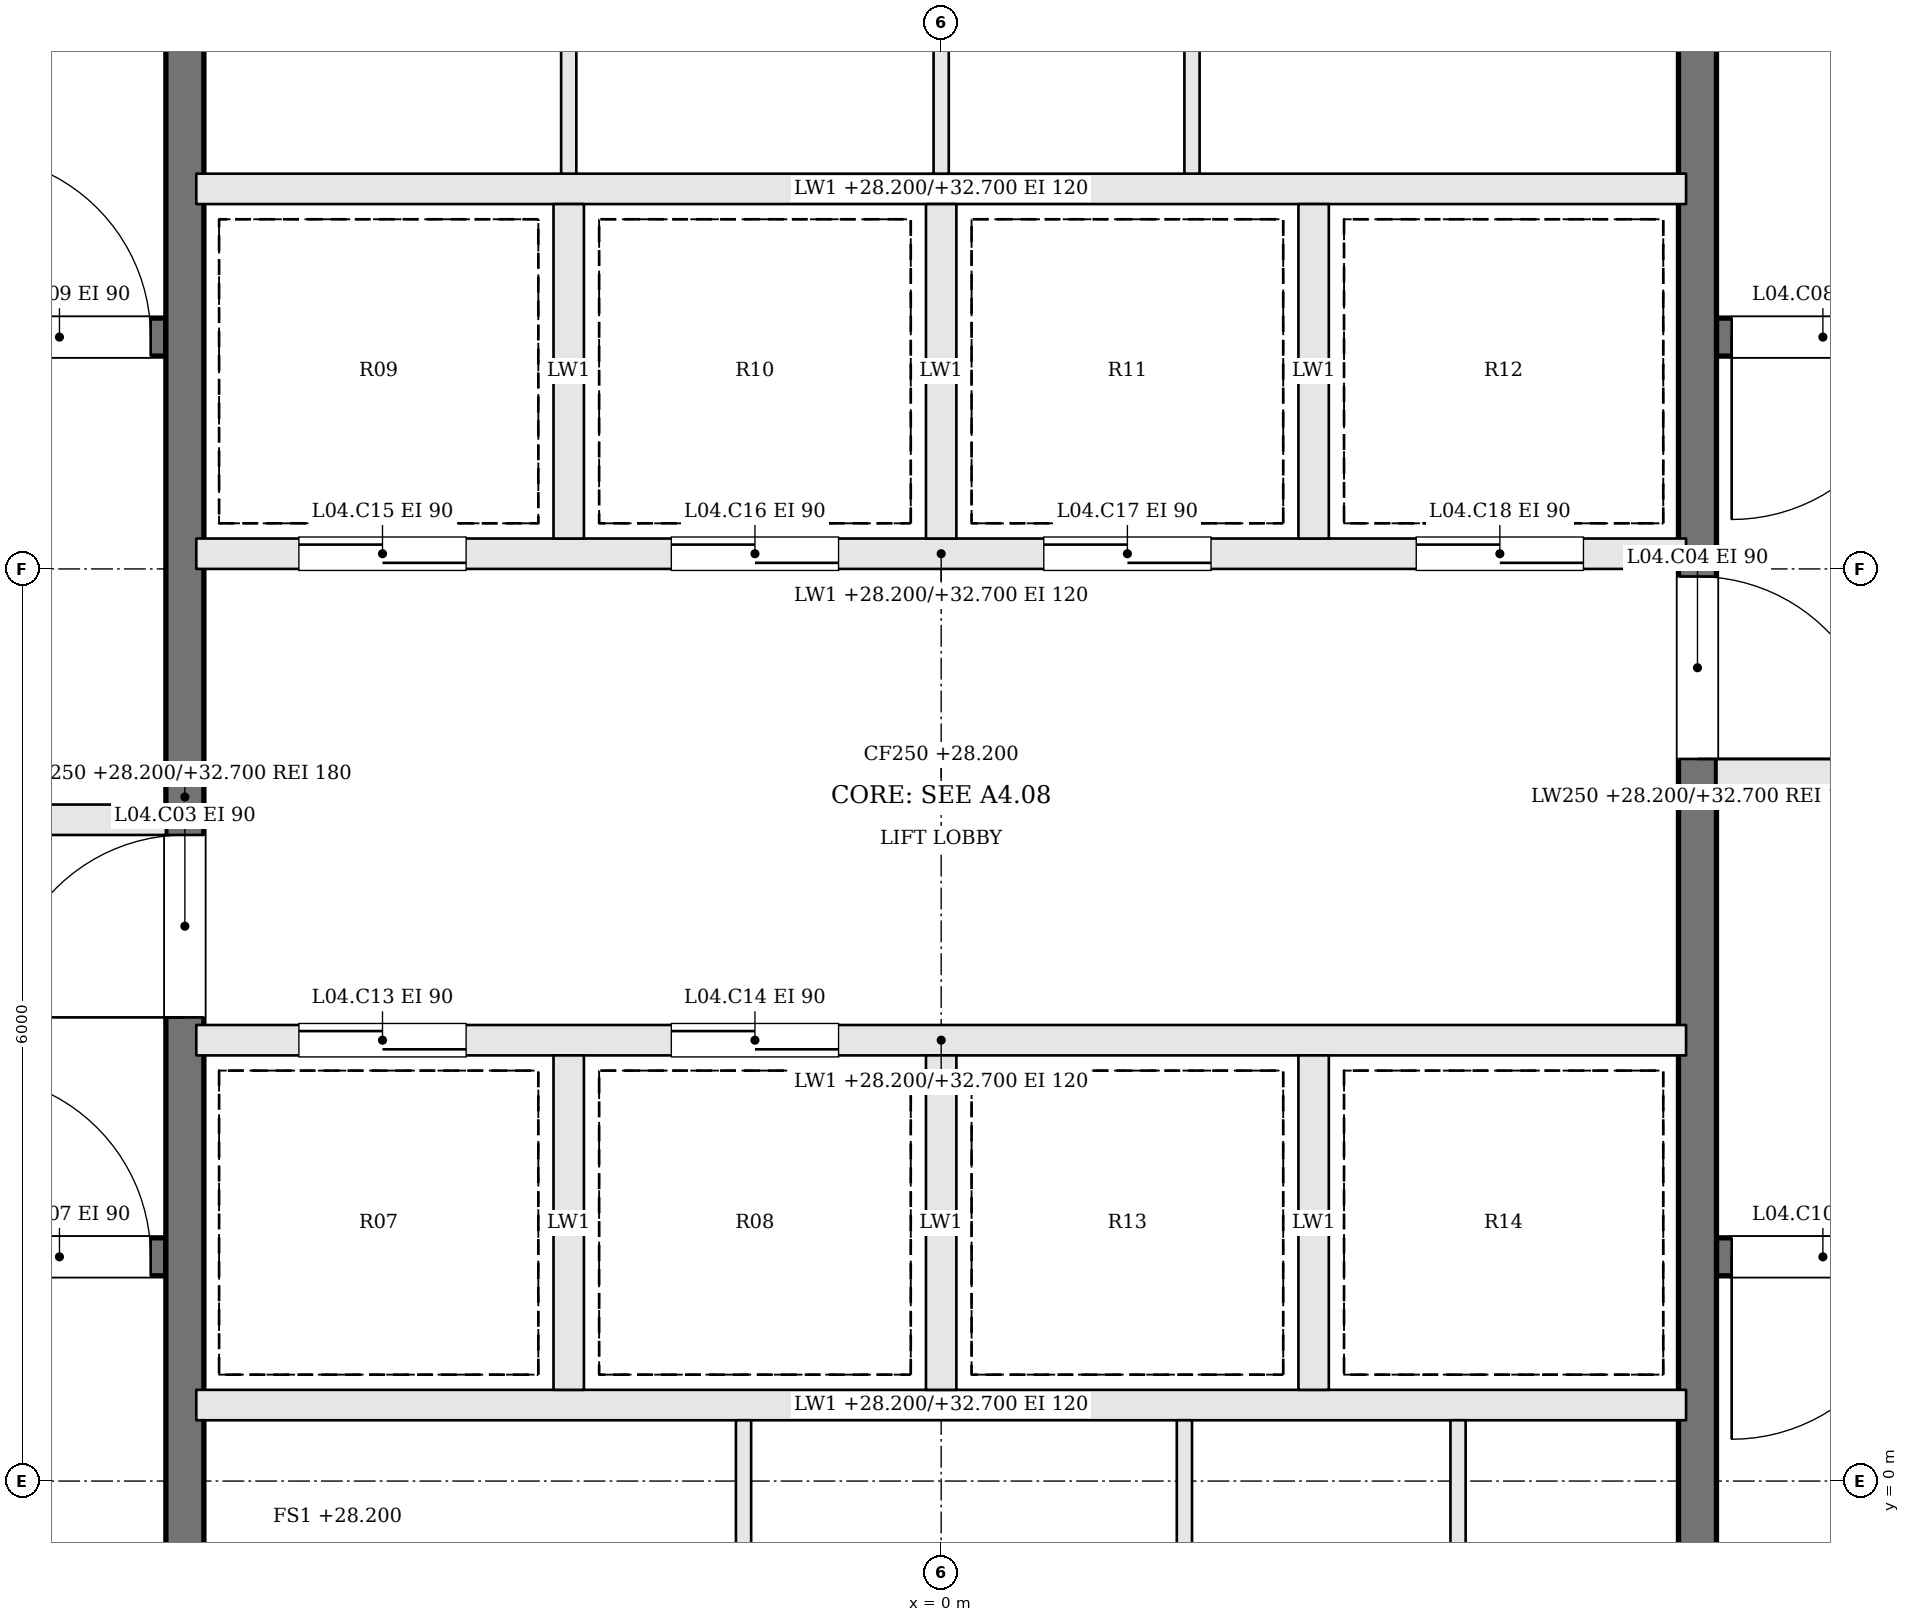
"""IFC4 building model, lengths in metres.
Left out: names, types, materials, properties, quantities, classifications, styles, units other than length and angle.
Written with IfcOpenShell. Run it as: python <this file> out.ifc"""

import sys

from ifc_helpers import new_model, si_unit, direction, frame, frame_2d, origin, place, context, subcontext, project, spatial, rectangle, extrude, element, fill, save


model = new_model("IFC4")
c1 = context("Model", 3, precision=1e-05, world=origin(), true_north=direction((0.0, 1.0)))
c2 = subcontext(c1, "Body", "Model", "MODEL_VIEW")
j1 = project(units=[si_unit("LENGTHUNIT", "METRE"), si_unit("PLANEANGLEUNIT", "RADIAN")], contexts=[c1])
p1 = place(None, origin())
s1 = spatial("IfcSite", under=j1, at=p1, CompositionType="ELEMENT")
p2 = place(p1, origin())
s2 = spatial("IfcBuilding", under=s1, at=p2, CompositionType="ELEMENT")
p3 = place(p2, frame((0.0, 0.0, 28.2)))
s3 = spatial("IfcBuildingStorey", under=s2, at=p3, CompositionType="ELEMENT", Elevation=28.2)
p4 = place(p3, frame((-11.6, 1.475, 0.0), z_axis=(0.0, 0.0, 1.0), x_axis=(1.0, 0.0, 0.0)))
e1 = element("IfcWall", 1, at=p4, inside=s3, PredefinedType="SOLIDWALL", context=c2, shape_type="SweptSolid", body=[
    extrude(rectangle(XDim=6.5, YDim=0.25, at=frame_2d((3.25, 0.0))), origin(), (0.0, 0.0, 1.0), 4.5),
])
p5 = place(p4, frame((5.2, 0.0, 0.0)))
e2 = element("IfcOpeningElement", 2, at=p5, cuts=e1, PredefinedType="OPENING", context=c2, shape_type="SweptSolid", body=[
    extrude(rectangle(XDim=1.2, YDim=2.1, at=frame_2d((0.6, 1.05))), frame((0.0, 0.135, 0.0), z_axis=(0.0, -1.0, 0.0), x_axis=(1.0, 0.0, 0.0)), (0.0, 0.0, 1.0), 0.27),
])
p6 = place(p3, frame((11.6, 7.525, 0.0), z_axis=(0.0, 0.0, 1.0), x_axis=(-1.0, 0.0, 0.0)))
e3 = element("IfcWall", 3, at=p6, inside=s3, PredefinedType="SOLIDWALL", context=c2, shape_type="SweptSolid", body=[
    extrude(rectangle(XDim=6.5, YDim=0.25, at=frame_2d((3.25, 0.0))), origin(), (0.0, 0.0, 1.0), 4.5),
])
p7 = place(p6, frame((5.2, 0.0, 0.0)))
e4 = element("IfcOpeningElement", 4, at=p7, cuts=e3, PredefinedType="OPENING", context=c2, shape_type="SweptSolid", body=[
    extrude(rectangle(XDim=1.2, YDim=2.1, at=frame_2d((0.6, 1.05))), frame((0.0, 0.135, 0.0), z_axis=(0.0, -1.0, 0.0), x_axis=(1.0, 0.0, 0.0)), (0.0, 0.0, 1.0), 0.27),
])
p8 = place(p3, frame((-11.6, 4.35, 0.0), z_axis=(0.0, 0.0, 1.0), x_axis=(1.0, 0.0, 0.0)))
e5 = element("IfcWall", 5, at=p8, inside=s3, PredefinedType="SOLIDWALL", context=c2, shape_type="SweptSolid", body=[
    extrude(rectangle(XDim=6.5, YDim=0.2, at=frame_2d((3.25, 0.0))), origin(), (0.0, 0.0, 1.0), 4.5),
])
p9 = place(p8, frame((3.8, 0.0, 0.0)))
e6 = element("IfcOpeningElement", 6, at=p9, cuts=e5, PredefinedType="OPENING", context=c2, shape_type="SweptSolid", body=[
    extrude(rectangle(XDim=1.2, YDim=2.1, at=frame_2d((0.6, 1.05))), frame((0.0, 0.11, 0.0), z_axis=(0.0, -1.0, 0.0), x_axis=(1.0, 0.0, 0.0)), (0.0, 0.0, 1.0), 0.22),
])
p10 = place(p8, frame((0.5, 0.0, 0.0)))
e7 = element("IfcOpeningElement", 7, at=p10, cuts=e5, PredefinedType="OPENING", context=c2, shape_type="SweptSolid", body=[
    extrude(rectangle(XDim=1.2, YDim=2.1, at=frame_2d((0.6, 1.05))), frame((0.0, 0.11, 0.0), z_axis=(0.0, -1.0, 0.0), x_axis=(1.0, 0.0, 0.0)), (0.0, 0.0, 1.0), 0.22),
])
p11 = place(p3, frame((11.6, 4.65, 0.0), z_axis=(0.0, 0.0, 1.0), x_axis=(-1.0, 0.0, 0.0)))
e8 = element("IfcWall", 8, at=p11, inside=s3, PredefinedType="SOLIDWALL", context=c2, shape_type="SweptSolid", body=[
    extrude(rectangle(XDim=6.5, YDim=0.2, at=frame_2d((3.25, 0.0))), origin(), (0.0, 0.0, 1.0), 4.5),
])
p12 = place(p11, frame((3.8, 0.0, 0.0)))
e9 = element("IfcOpeningElement", 9, at=p12, cuts=e8, PredefinedType="OPENING", context=c2, shape_type="SweptSolid", body=[
    extrude(rectangle(XDim=1.2, YDim=2.1, at=frame_2d((0.6, 1.05))), frame((0.0, 0.11, 0.0), z_axis=(0.0, -1.0, 0.0), x_axis=(1.0, 0.0, 0.0)), (0.0, 0.0, 1.0), 0.22),
])
p13 = place(p11, frame((0.5, 0.0, 0.0)))
e10 = element("IfcOpeningElement", 10, at=p13, cuts=e8, PredefinedType="OPENING", context=c2, shape_type="SweptSolid", body=[
    extrude(rectangle(XDim=1.2, YDim=2.1, at=frame_2d((0.6, 1.05))), frame((0.0, 0.11, 0.0), z_axis=(0.0, -1.0, 0.0), x_axis=(1.0, 0.0, 0.0)), (0.0, 0.0, 1.0), 0.22),
])
p14 = place(p3, frame((-11.6, 7.525, 0.0), z_axis=(0.0, 0.0, 1.0), x_axis=(1.0, 0.0, 0.0)))
e11 = element("IfcWall", 11, at=p14, inside=s3, PredefinedType="SOLIDWALL", context=c2, shape_type="SweptSolid", body=[
    extrude(rectangle(XDim=6.5, YDim=0.25, at=frame_2d((3.25, 0.0))), origin(), (0.0, 0.0, 1.0), 4.5),
])
p15 = place(p14, frame((5.2, 0.0, 0.0)))
e12 = element("IfcOpeningElement", 12, at=p15, cuts=e11, PredefinedType="OPENING", context=c2, shape_type="SweptSolid", body=[
    extrude(rectangle(XDim=1.2, YDim=2.1, at=frame_2d((0.6, 1.05))), frame((0.0, 0.135, 0.0), z_axis=(0.0, -1.0, 0.0), x_axis=(1.0, 0.0, 0.0)), (0.0, 0.0, 1.0), 0.27),
])
p16 = place(p3, frame((11.6, 1.475, 0.0), z_axis=(0.0, 0.0, 1.0), x_axis=(-1.0, 0.0, 0.0)))
e13 = element("IfcWall", 13, at=p16, inside=s3, PredefinedType="SOLIDWALL", context=c2, shape_type="SweptSolid", body=[
    extrude(rectangle(XDim=6.5, YDim=0.25, at=frame_2d((3.25, 0.0))), origin(), (0.0, 0.0, 1.0), 4.5),
])
p17 = place(p16, frame((5.2, 0.0, 0.0)))
e14 = element("IfcOpeningElement", 14, at=p17, cuts=e13, PredefinedType="OPENING", context=c2, shape_type="SweptSolid", body=[
    extrude(rectangle(XDim=1.2, YDim=2.1, at=frame_2d((0.6, 1.05))), frame((0.0, 0.135, 0.0), z_axis=(0.0, -1.0, 0.0), x_axis=(1.0, 0.0, 0.0)), (0.0, 0.0, 1.0), 0.27),
])
p18 = place(p3, frame((-4.975, -1.6, 0.0), z_axis=(0.0, 0.0, 1.0), x_axis=(0.0, 1.0, 0.0)))
e15 = element("IfcWall", 15, at=p18, inside=s3, PredefinedType="SOLIDWALL", context=c2, shape_type="SweptSolid", body=[
    extrude(rectangle(XDim=12.2, YDim=0.25, at=frame_2d((6.1, 0.0))), origin(), (0.0, 0.0, 1.0), 4.5),
])
p19 = place(p18, frame((4.65, 0.0, 0.0)))
e16 = element("IfcOpeningElement", 16, at=p19, cuts=e15, PredefinedType="OPENING", context=c2, shape_type="SweptSolid", body=[
    extrude(rectangle(XDim=1.2, YDim=2.1, at=frame_2d((0.6, 1.05))), frame((0.0, 0.135, 0.0), z_axis=(0.0, -1.0, 0.0), x_axis=(1.0, 0.0, 0.0)), (0.0, 0.0, 1.0), 0.27),
])
p20 = place(p3, frame((4.975, 10.6, 0.0), z_axis=(0.0, 0.0, 1.0), x_axis=(0.0, -1.0, 0.0)))
e17 = element("IfcWall", 17, at=p20, inside=s3, PredefinedType="SOLIDWALL", context=c2, shape_type="SweptSolid", body=[
    extrude(rectangle(XDim=12.2, YDim=0.25, at=frame_2d((6.1, 0.0))), origin(), (0.0, 0.0, 1.0), 4.5),
])
p21 = place(p20, frame((4.65, 0.0, 0.0)))
e18 = element("IfcOpeningElement", 18, at=p21, cuts=e17, PredefinedType="OPENING", context=c2, shape_type="SweptSolid", body=[
    extrude(rectangle(XDim=1.2, YDim=2.1, at=frame_2d((0.6, 1.05))), frame((0.0, 0.135, 0.0), z_axis=(0.0, -1.0, 0.0), x_axis=(1.0, 0.0, 0.0)), (0.0, 0.0, 1.0), 0.27),
])
p22 = place(p3, frame((-4.9, 0.5, 0.0), z_axis=(0.0, 0.0, 1.0), x_axis=(1.0, 0.0, 0.0)))
e19 = element("IfcWall", 19, at=p22, inside=s3, PredefinedType="SOLIDWALL", context=c2, shape_type="SweptSolid", body=[
    extrude(rectangle(XDim=9.8, YDim=0.2, at=frame_2d((4.9, 0.0))), origin(), (0.0, 0.0, 1.0), 4.5),
])
p23 = place(p3, frame((-4.9, 2.9, 0.0), z_axis=(0.0, 0.0, 1.0), x_axis=(1.0, 0.0, 0.0)))
e20 = element("IfcWall", 20, at=p23, inside=s3, PredefinedType="SOLIDWALL", context=c2, shape_type="SweptSolid", body=[
    extrude(rectangle(XDim=9.8, YDim=0.2, at=frame_2d((4.9, 0.0))), origin(), (0.0, 0.0, 1.0), 4.5),
])
p24 = place(p23, frame((0.675, 0.0, 0.0)))
e21 = element("IfcOpeningElement", 21, at=p24, cuts=e20, PredefinedType="OPENING", context=c2, shape_type="SweptSolid", body=[
    extrude(rectangle(XDim=1.1, YDim=2.1, at=frame_2d((0.55, 1.05))), frame((0.0, 0.11, 0.0), z_axis=(0.0, -1.0, 0.0), x_axis=(1.0, 0.0, 0.0)), (0.0, 0.0, 1.0), 0.22),
])
p25 = place(p23, frame((3.125, 0.0, 0.0)))
e22 = element("IfcOpeningElement", 22, at=p25, cuts=e20, PredefinedType="OPENING", context=c2, shape_type="SweptSolid", body=[
    extrude(rectangle(XDim=1.1, YDim=2.1, at=frame_2d((0.55, 1.05))), frame((0.0, 0.11, 0.0), z_axis=(0.0, -1.0, 0.0), x_axis=(1.0, 0.0, 0.0)), (0.0, 0.0, 1.0), 0.22),
])
p26 = place(p3, frame((-4.9, 6.1, 0.0), z_axis=(0.0, 0.0, 1.0), x_axis=(1.0, 0.0, 0.0)))
e23 = element("IfcWall", 23, at=p26, inside=s3, PredefinedType="SOLIDWALL", context=c2, shape_type="SweptSolid", body=[
    extrude(rectangle(XDim=9.8, YDim=0.2, at=frame_2d((4.9, 0.0))), origin(), (0.0, 0.0, 1.0), 4.5),
])
p27 = place(p26, frame((0.675, 0.0, 0.0)))
e24 = element("IfcOpeningElement", 24, at=p27, cuts=e23, PredefinedType="OPENING", context=c2, shape_type="SweptSolid", body=[
    extrude(rectangle(XDim=1.1, YDim=2.1, at=frame_2d((0.55, 1.05))), frame((0.0, 0.11, 0.0), z_axis=(0.0, -1.0, 0.0), x_axis=(1.0, 0.0, 0.0)), (0.0, 0.0, 1.0), 0.22),
])
p28 = place(p26, frame((3.125, 0.0, 0.0)))
e25 = element("IfcOpeningElement", 25, at=p28, cuts=e23, PredefinedType="OPENING", context=c2, shape_type="SweptSolid", body=[
    extrude(rectangle(XDim=1.1, YDim=2.1, at=frame_2d((0.55, 1.05))), frame((0.0, 0.11, 0.0), z_axis=(0.0, -1.0, 0.0), x_axis=(1.0, 0.0, 0.0)), (0.0, 0.0, 1.0), 0.22),
])
p29 = place(p26, frame((5.575, 0.0, 0.0)))
e26 = element("IfcOpeningElement", 26, at=p29, cuts=e23, PredefinedType="OPENING", context=c2, shape_type="SweptSolid", body=[
    extrude(rectangle(XDim=1.1, YDim=2.1, at=frame_2d((0.55, 1.05))), frame((0.0, 0.11, 0.0), z_axis=(0.0, -1.0, 0.0), x_axis=(1.0, 0.0, 0.0)), (0.0, 0.0, 1.0), 0.22),
])
p30 = place(p26, frame((8.025, 0.0, 0.0)))
e27 = element("IfcOpeningElement", 27, at=p30, cuts=e23, PredefinedType="OPENING", context=c2, shape_type="SweptSolid", body=[
    extrude(rectangle(XDim=1.1, YDim=2.1, at=frame_2d((0.55, 1.05))), frame((0.0, 0.11, 0.0), z_axis=(0.0, -1.0, 0.0), x_axis=(1.0, 0.0, 0.0)), (0.0, 0.0, 1.0), 0.22),
])
p31 = place(p3, frame((-4.9, 8.5, 0.0), z_axis=(0.0, 0.0, 1.0), x_axis=(1.0, 0.0, 0.0)))
e28 = element("IfcWall", 28, at=p31, inside=s3, PredefinedType="SOLIDWALL", context=c2, shape_type="SweptSolid", body=[
    extrude(rectangle(XDim=9.8, YDim=0.2, at=frame_2d((4.9, 0.0))), origin(), (0.0, 0.0, 1.0), 4.5),
])
for number, where, z_axis, x_axis in (
    (29, (-2.45, 0.6, 0.0), (0.0, 0.0, 1.0), (0.0, 1.0, 0.0)),
    (30, (0.0, 0.6, 0.0), (0.0, 0.0, 1.0), (0.0, 1.0, 0.0)),
    (31, (2.45, 0.6, 0.0), (0.0, 0.0, 1.0), (0.0, 1.0, 0.0)),
    (32, (-2.45, 6.2, 0.0), (0.0, 0.0, 1.0), (0.0, 1.0, 0.0)),
    (33, (0.0, 6.2, 0.0), (0.0, 0.0, 1.0), (0.0, 1.0, 0.0)),
    (34, (2.45, 6.2, 0.0), (0.0, 0.0, 1.0), (0.0, 1.0, 0.0)),
):
    element("IfcWall", number, at=place(p3, frame(where, z_axis=z_axis, x_axis=x_axis)), inside=s3, PredefinedType="SOLIDWALL", context=c2, shape_type="SweptSolid", body=[
        extrude(rectangle(XDim=2.2, YDim=0.2, at=frame_2d((1.1, 0.0))), origin(), (0.0, 0.0, 1.0), 4.5),
    ])
for number, where, z_axis, x_axis in (
    (35, (-1.3, -1.6, 0.0), (0.0, 0.0, 1.0), (0.0, 1.0, 0.0)),
    (36, (1.6, -1.6, 0.0), (0.0, 0.0, 1.0), (0.0, 1.0, 0.0)),
    (37, (3.4, -1.6, 0.0), (0.0, 0.0, 1.0), (0.0, 1.0, 0.0)),
    (38, (-2.45, 8.6, 0.0), (0.0, 0.0, 1.0), (0.0, 1.0, 0.0)),
    (39, (0.0, 8.6, 0.0), (0.0, 0.0, 1.0), (0.0, 1.0, 0.0)),
    (40, (1.65, 8.6, 0.0), (0.0, 0.0, 1.0), (0.0, 1.0, 0.0)),
):
    element("IfcWall", number, at=place(p3, frame(where, z_axis=z_axis, x_axis=x_axis)), inside=s3, PredefinedType="PARTITIONING", context=c2, shape_type="SweptSolid", body=[
        extrude(rectangle(XDim=2.0, YDim=0.1, at=frame_2d((1.0, 0.0))), origin(), (0.0, 0.0, 1.0), 4.5),
    ])
p32 = place(p19, origin())
e41 = element("IfcDoor", 41, at=p32, inside=s3, OperationType="SINGLE_SWING_LEFT", PredefinedType="DOOR", context=c2, shape_type="SweptSolid", body=[
    extrude(rectangle(XDim=1.2, YDim=2.1, at=frame_2d((0.6, 1.05))), frame((0.0, 0.025, 0.0), z_axis=(0.0, -1.0, 0.0), x_axis=(1.0, 0.0, 0.0)), (0.0, 0.0, 1.0), 0.05),
])
fill(e16, e41)
p33 = place(p21, origin())
e42 = element("IfcDoor", 42, at=p33, inside=s3, OperationType="SINGLE_SWING_RIGHT", PredefinedType="DOOR", context=c2, shape_type="SweptSolid", body=[
    extrude(rectangle(XDim=1.2, YDim=2.1, at=frame_2d((0.6, 1.05))), frame((0.0, 0.025, 0.0), z_axis=(0.0, -1.0, 0.0), x_axis=(1.0, 0.0, 0.0)), (0.0, 0.0, 1.0), 0.05),
])
fill(e18, e42)
p34 = place(p5, origin())
e43 = element("IfcDoor", 43, at=p34, inside=s3, OperationType="SINGLE_SWING_LEFT", PredefinedType="DOOR", context=c2, shape_type="SweptSolid", body=[
    extrude(rectangle(XDim=1.2, YDim=2.1, at=frame_2d((0.6, 1.05))), frame((0.0, 0.025, 0.0), z_axis=(0.0, -1.0, 0.0), x_axis=(1.0, 0.0, 0.0)), (0.0, 0.0, 1.0), 0.05),
])
fill(e2, e43)
p35 = place(p7, origin())
e44 = element("IfcDoor", 44, at=p35, inside=s3, OperationType="SINGLE_SWING_RIGHT", PredefinedType="DOOR", context=c2, shape_type="SweptSolid", body=[
    extrude(rectangle(XDim=1.2, YDim=2.1, at=frame_2d((0.6, 1.05))), frame((0.0, 0.025, 0.0), z_axis=(0.0, -1.0, 0.0), x_axis=(1.0, 0.0, 0.0)), (0.0, 0.0, 1.0), 0.05),
])
fill(e4, e44)
p36 = place(p15, origin())
e45 = element("IfcDoor", 45, at=p36, inside=s3, OperationType="SINGLE_SWING_LEFT", PredefinedType="DOOR", context=c2, shape_type="SweptSolid", body=[
    extrude(rectangle(XDim=1.2, YDim=2.1, at=frame_2d((0.6, 1.05))), frame((0.0, 0.025, 0.0), z_axis=(0.0, -1.0, 0.0), x_axis=(1.0, 0.0, 0.0)), (0.0, 0.0, 1.0), 0.05),
])
fill(e12, e45)
p37 = place(p17, origin())
e46 = element("IfcDoor", 46, at=p37, inside=s3, OperationType="SINGLE_SWING_RIGHT", PredefinedType="DOOR", context=c2, shape_type="SweptSolid", body=[
    extrude(rectangle(XDim=1.2, YDim=2.1, at=frame_2d((0.6, 1.05))), frame((0.0, 0.025, 0.0), z_axis=(0.0, -1.0, 0.0), x_axis=(1.0, 0.0, 0.0)), (0.0, 0.0, 1.0), 0.05),
])
fill(e14, e46)
p38 = place(p24, origin())
e47 = element("IfcDoor", 47, at=p38, inside=s3, OperationType="SLIDING_TO_RIGHT", PredefinedType="DOOR", context=c2, shape_type="SweptSolid", body=[
    extrude(rectangle(XDim=1.1, YDim=2.1, at=frame_2d((0.55, 1.05))), frame((0.0, 0.025, 0.0), z_axis=(0.0, -1.0, 0.0), x_axis=(1.0, 0.0, 0.0)), (0.0, 0.0, 1.0), 0.05),
])
fill(e21, e47)
p39 = place(p25, origin())
e48 = element("IfcDoor", 48, at=p39, inside=s3, OperationType="SLIDING_TO_LEFT", PredefinedType="DOOR", context=c2, shape_type="SweptSolid", body=[
    extrude(rectangle(XDim=1.1, YDim=2.1, at=frame_2d((0.55, 1.05))), frame((0.0, 0.025, 0.0), z_axis=(0.0, -1.0, 0.0), x_axis=(1.0, 0.0, 0.0)), (0.0, 0.0, 1.0), 0.05),
])
fill(e22, e48)
p40 = place(p27, origin())
e49 = element("IfcDoor", 49, at=p40, inside=s3, OperationType="SLIDING_TO_RIGHT", PredefinedType="DOOR", context=c2, shape_type="SweptSolid", body=[
    extrude(rectangle(XDim=1.1, YDim=2.1, at=frame_2d((0.55, 1.05))), frame((0.0, 0.025, 0.0), z_axis=(0.0, -1.0, 0.0), x_axis=(1.0, 0.0, 0.0)), (0.0, 0.0, 1.0), 0.05),
])
fill(e24, e49)
p41 = place(p28, origin())
e50 = element("IfcDoor", 50, at=p41, inside=s3, OperationType="SLIDING_TO_LEFT", PredefinedType="DOOR", context=c2, shape_type="SweptSolid", body=[
    extrude(rectangle(XDim=1.1, YDim=2.1, at=frame_2d((0.55, 1.05))), frame((0.0, 0.025, 0.0), z_axis=(0.0, -1.0, 0.0), x_axis=(1.0, 0.0, 0.0)), (0.0, 0.0, 1.0), 0.05),
])
fill(e25, e50)
p42 = place(p29, origin())
e51 = element("IfcDoor", 51, at=p42, inside=s3, OperationType="SLIDING_TO_RIGHT", PredefinedType="DOOR", context=c2, shape_type="SweptSolid", body=[
    extrude(rectangle(XDim=1.1, YDim=2.1, at=frame_2d((0.55, 1.05))), frame((0.0, 0.025, 0.0), z_axis=(0.0, -1.0, 0.0), x_axis=(1.0, 0.0, 0.0)), (0.0, 0.0, 1.0), 0.05),
])
fill(e26, e51)
p43 = place(p30, origin())
e52 = element("IfcDoor", 52, at=p43, inside=s3, OperationType="SLIDING_TO_LEFT", PredefinedType="DOOR", context=c2, shape_type="SweptSolid", body=[
    extrude(rectangle(XDim=1.1, YDim=2.1, at=frame_2d((0.55, 1.05))), frame((0.0, 0.025, 0.0), z_axis=(0.0, -1.0, 0.0), x_axis=(1.0, 0.0, 0.0)), (0.0, 0.0, 1.0), 0.05),
])
fill(e27, e52)
save(model, sys.argv[1])
